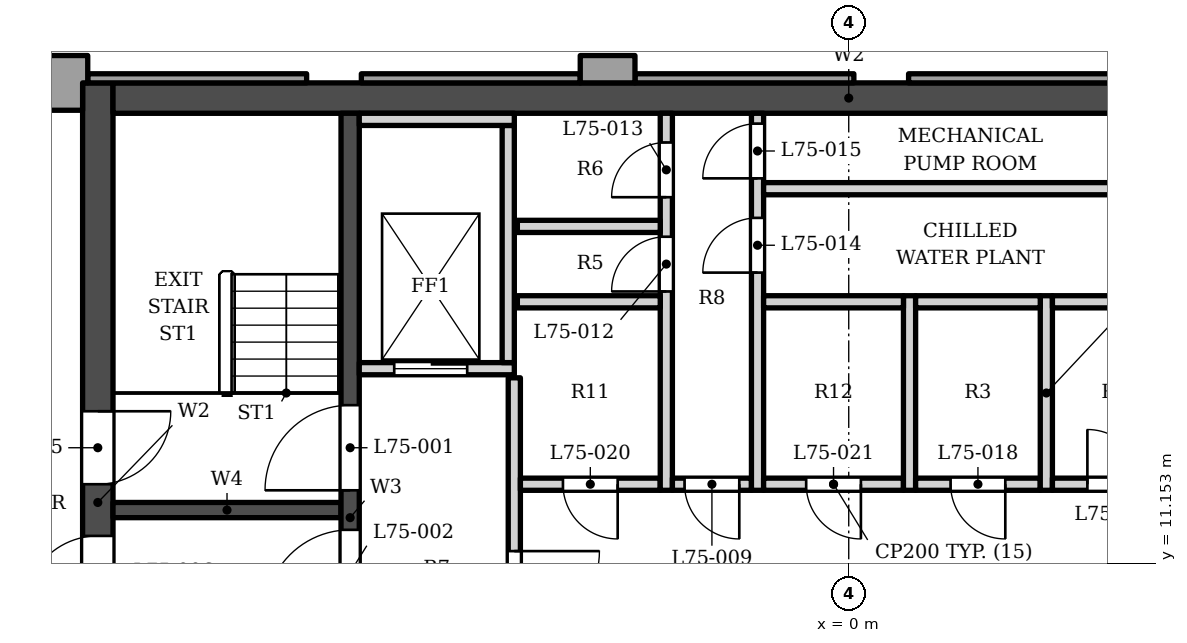
"""IFC4 building model, lengths in metres.
Left out: names, types, materials, properties, quantities, classifications, styles, units other than length and angle.
Written with IfcOpenShell. Run it as: python <this file> out.ifc"""

import sys

from ifc_helpers import new_model, si_unit, direction, frame, frame_2d, origin, place, context, subcontext, project, spatial, polyline, rectangle, outline, extrude, element, fill, save


model = new_model("IFC4")
c1 = context("Model", 3, precision=1e-05, world=origin(), true_north=direction((0.0, 1.0)))
c2 = subcontext(c1, "Body", "Model", "MODEL_VIEW")
j1 = project(units=[si_unit("LENGTHUNIT", "METRE"), si_unit("PLANEANGLEUNIT", "RADIAN")], contexts=[c1])
p1 = place(None, origin())
s1 = spatial("IfcSite", under=j1, at=p1, CompositionType="ELEMENT")
p2 = place(p1, origin())
s2 = spatial("IfcBuilding", under=s1, at=p2, CompositionType="ELEMENT")
p3 = place(p2, frame((0.0, 0.0, 320.5)))
s3 = spatial("IfcBuildingStorey", under=s2, at=p3, CompositionType="ELEMENT", Elevation=320.5)
p4 = place(p3, frame((-12.1, 18.802, 0.0), z_axis=(0.0, 0.0, 1.0), x_axis=(1.0, 0.0, 0.0)))
e1 = element("IfcWall", 1, at=p4, inside=s3, PredefinedType="SHEAR", context=c2, shape_type="SweptSolid", body=[
    extrude(rectangle(XDim=24.2, YDim=0.5, at=frame_2d((12.1, 0.0))), origin(), (0.0, 0.0, 1.0), 5.0),
])
p5 = place(p3, frame((-12.35, 5.253, 0.0), z_axis=(0.0, 0.0, 1.0), x_axis=(0.0, 1.0, 0.0)))
e2 = element("IfcWall", 2, at=p5, inside=s3, PredefinedType="SHEAR", context=c2, shape_type="SweptSolid", body=[
    extrude(rectangle(XDim=13.8, YDim=0.5, at=frame_2d((6.9, 0.0))), origin(), (0.0, 0.0, 1.0), 5.0),
])
p6 = place(p5, frame((7.2, 0.0, 0.0)))
e3 = element("IfcOpeningElement", 3, at=p6, cuts=e2, PredefinedType="OPENING", context=c2, shape_type="SweptSolid", body=[
    extrude(rectangle(XDim=1.2, YDim=2.1, at=frame_2d((0.6, 1.05))), frame((0.0, 0.26, 0.0), z_axis=(0.0, -1.0, 0.0), x_axis=(1.0, 0.0, 0.0)), (0.0, 0.0, 1.0), 0.52),
])
p7 = place(p5, frame((5.15, 0.0, 0.0)))
e4 = element("IfcOpeningElement", 4, at=p7, cuts=e2, PredefinedType="OPENING", context=c2, shape_type="SweptSolid", body=[
    extrude(rectangle(XDim=1.2, YDim=2.1, at=frame_2d((0.6, 1.05))), frame((0.0, 0.26, 0.0), z_axis=(0.0, -1.0, 0.0), x_axis=(1.0, 0.0, 0.0)), (0.0, 0.0, 1.0), 0.52),
])
p8 = place(p3, frame((-8.2, 5.253, 0.0), z_axis=(0.0, 0.0, 1.0), x_axis=(0.0, 1.0, 0.0)))
e5 = element("IfcWall", 5, at=p8, inside=s3, PredefinedType="SHEAR", context=c2, shape_type="SweptSolid", body=[
    extrude(rectangle(XDim=13.3, YDim=0.3, at=frame_2d((6.65, 0.0))), origin(), (0.0, 0.0, 1.0), 5.0),
])
p9 = place(p8, frame((7.1, 0.0, 0.0)))
e6 = element("IfcOpeningElement", 6, at=p9, cuts=e5, PredefinedType="OPENING", context=c2, shape_type="SweptSolid", body=[
    extrude(rectangle(XDim=1.4, YDim=2.1, at=frame_2d((0.7, 1.05))), frame((0.0, 0.16, 0.0), z_axis=(0.0, -1.0, 0.0), x_axis=(1.0, 0.0, 0.0)), (0.0, 0.0, 1.0), 0.32),
])
p10 = place(p8, frame((5.05, 0.0, 0.0)))
e7 = element("IfcOpeningElement", 7, at=p10, cuts=e5, PredefinedType="OPENING", context=c2, shape_type="SweptSolid", body=[
    extrude(rectangle(XDim=1.4, YDim=2.1, at=frame_2d((0.7, 1.05))), frame((0.0, 0.16, 0.0), z_axis=(0.0, -1.0, 0.0), x_axis=(1.0, 0.0, 0.0)), (0.0, 0.0, 1.0), 0.32),
])
p11 = place(p3, frame((-12.1, 12.028, 0.0), z_axis=(0.0, 0.0, 1.0), x_axis=(1.0, 0.0, 0.0)))
e8 = element("IfcWall", 8, at=p11, inside=s3, PredefinedType="SHEAR", context=c2, shape_type="SweptSolid", body=[
    extrude(rectangle(XDim=3.75, YDim=0.25, at=frame_2d((1.875, 0.0))), origin(), (0.0, 0.0, 1.0), 5.0),
])
p12 = place(p3, origin())
e9 = element("IfcWall", 9, at=p12, inside=s3, PredefinedType="SOLIDWALL", context=c2, shape_type="SweptSolid", body=[
    extrude(outline(polyline([(-4.416, 19.502), (-4.416, 19.052), (-3.516, 19.052), (-3.516, 19.502), (-4.416, 19.502)])), origin(), (0.0, 0.0, 1.0), 3.8),
])
p13 = place(p3, origin())
e10 = element("IfcWall", 10, at=p13, inside=s3, PredefinedType="SOLIDWALL", context=c2, shape_type="SweptSolid", body=[
    extrude(outline(polyline([(-13.416, 19.502), (-13.416, 18.603), (-12.6, 18.603), (-12.6, 19.052), (-12.516, 19.052), (-12.516, 19.502), (-13.416, 19.502)])), origin(), (0.0, 0.0, 1.0), 3.8),
])
p14 = place(p3, origin())
e11 = element("IfcWall", 11, at=p14, inside=s3, PredefinedType="ELEMENTEDWALL", context=c2, shape_type="SweptSolid", body=[
    extrude(outline(polyline([(4.584, 19.203), (0.984, 19.203), (0.984, 19.052), (4.584, 19.052), (4.584, 19.203)])), origin(), (0.0, 0.0, 1.0), 3.8),
])
p15 = place(p3, origin())
e12 = element("IfcWall", 12, at=p15, inside=s3, PredefinedType="ELEMENTEDWALL", context=c2, shape_type="SweptSolid", body=[
    extrude(outline(polyline([(0.084, 19.203), (-3.516, 19.203), (-3.516, 19.052), (0.084, 19.052), (0.084, 19.203)])), origin(), (0.0, 0.0, 1.0), 3.8),
])
p16 = place(p3, origin())
e13 = element("IfcWall", 13, at=p16, inside=s3, PredefinedType="ELEMENTEDWALL", context=c2, shape_type="SweptSolid", body=[
    extrude(outline(polyline([(-4.416, 19.203), (-8.016, 19.203), (-8.016, 19.052), (-4.416, 19.052), (-4.416, 19.203)])), origin(), (0.0, 0.0, 1.0), 3.8),
])
p17 = place(p3, origin())
e14 = element("IfcWall", 14, at=p17, inside=s3, PredefinedType="ELEMENTEDWALL", context=c2, shape_type="SweptSolid", body=[
    extrude(outline(polyline([(-8.916, 19.203), (-12.516, 19.203), (-12.516, 19.052), (-8.916, 19.052), (-8.916, 19.203)])), origin(), (0.0, 0.0, 1.0), 3.8),
])
p18 = place(p3, frame((-5.5, 6.353, 0.0), z_axis=(0.0, 0.0, 1.0), x_axis=(0.0, 1.0, 0.0)))
e15 = element("IfcWall", 15, at=p18, inside=s3, PredefinedType="SOLIDWALL", context=c2, shape_type="SweptSolid", body=[
    extrude(rectangle(XDim=7.85, YDim=0.2, at=frame_2d((3.925, 0.0))), origin(), (0.0, 0.0, 1.0), 4.8),
])
p19 = place(p18, frame((3.6, 0.0, 0.0)))
e16 = element("IfcOpeningElement", 16, at=p19, cuts=e15, PredefinedType="OPENING", context=c2, shape_type="SweptSolid", body=[
    extrude(rectangle(XDim=1.4, YDim=2.1, at=frame_2d((0.7, 1.05))), frame((0.0, 0.11, 0.0), z_axis=(0.0, -1.0, 0.0), x_axis=(1.0, 0.0, 0.0)), (0.0, 0.0, 1.0), 0.22),
])
p20 = place(p3, frame((-5.4, 12.453, 0.0), z_axis=(0.0, 0.0, 1.0), x_axis=(1.0, 0.0, 0.0)))
e17 = element("IfcWall", 17, at=p20, inside=s3, PredefinedType="PARTITIONING", context=c2, shape_type="SweptSolid", body=[
    extrude(rectangle(XDim=2.3, YDim=0.2, at=frame_2d((1.15, 0.0))), origin(), (0.0, 0.0, 1.0), 4.8),
])
p21 = place(p20, frame((0.7, 0.0, 0.0)))
e18 = element("IfcOpeningElement", 18, at=p21, cuts=e17, PredefinedType="OPENING", context=c2, shape_type="SweptSolid", body=[
    extrude(rectangle(XDim=0.9, YDim=2.1, at=frame_2d((0.45, 1.05))), frame((0.0, 0.11, 0.0), z_axis=(0.0, -1.0, 0.0), x_axis=(1.0, 0.0, 0.0)), (0.0, 0.0, 1.0), 0.22),
])
p22 = place(p3, frame((-3.0, 12.353, 0.0), z_axis=(0.0, 0.0, 1.0), x_axis=(0.0, 1.0, 0.0)))
e19 = element("IfcWall", 19, at=p22, inside=s3, PredefinedType="PARTITIONING", context=c2, shape_type="SweptSolid", body=[
    extrude(rectangle(XDim=6.2, YDim=0.2, at=frame_2d((3.1, 0.0))), origin(), (0.0, 0.0, 1.0), 4.8),
])
p23 = place(p22, frame((3.27, 0.0, 0.0)))
e20 = element("IfcOpeningElement", 20, at=p23, cuts=e19, PredefinedType="OPENING", context=c2, shape_type="SweptSolid", body=[
    extrude(rectangle(XDim=0.9, YDim=2.1, at=frame_2d((0.45, 1.05))), frame((0.0, 0.11, 0.0), z_axis=(0.0, -1.0, 0.0), x_axis=(1.0, 0.0, 0.0)), (0.0, 0.0, 1.0), 0.22),
])
p24 = place(p22, frame((4.82, 0.0, 0.0)))
e21 = element("IfcOpeningElement", 21, at=p24, cuts=e19, PredefinedType="OPENING", context=c2, shape_type="SweptSolid", body=[
    extrude(rectangle(XDim=0.9, YDim=2.1, at=frame_2d((0.45, 1.05))), frame((0.0, 0.11, 0.0), z_axis=(0.0, -1.0, 0.0), x_axis=(1.0, 0.0, 0.0)), (0.0, 0.0, 1.0), 0.22),
])
p25 = place(p3, frame((-2.9, 12.453, 0.0), z_axis=(0.0, 0.0, 1.0), x_axis=(1.0, 0.0, 0.0)))
e22 = element("IfcWall", 22, at=p25, inside=s3, PredefinedType="PARTITIONING", context=c2, shape_type="SweptSolid", body=[
    extrude(rectangle(XDim=1.3, YDim=0.2, at=frame_2d((0.65, 0.0))), origin(), (0.0, 0.0, 1.0), 4.8),
])
p26 = place(p25, frame((0.2, 0.0, 0.0)))
e23 = element("IfcOpeningElement", 23, at=p26, cuts=e22, PredefinedType="OPENING", context=c2, shape_type="SweptSolid", body=[
    extrude(rectangle(XDim=0.9, YDim=2.1, at=frame_2d((0.45, 1.05))), frame((0.0, 0.11, 0.0), z_axis=(0.0, -1.0, 0.0), x_axis=(1.0, 0.0, 0.0)), (0.0, 0.0, 1.0), 0.22),
])
p27 = place(p3, frame((-1.5, 12.353, 0.0), z_axis=(0.0, 0.0, 1.0), x_axis=(0.0, 1.0, 0.0)))
e24 = element("IfcWall", 24, at=p27, inside=s3, PredefinedType="PARTITIONING", context=c2, shape_type="SweptSolid", body=[
    extrude(rectangle(XDim=6.2, YDim=0.2, at=frame_2d((3.1, 0.0))), origin(), (0.0, 0.0, 1.0), 4.8),
])
p28 = place(p27, frame((3.58, 0.0, 0.0)))
e25 = element("IfcOpeningElement", 25, at=p28, cuts=e24, PredefinedType="OPENING", context=c2, shape_type="SweptSolid", body=[
    extrude(rectangle(XDim=0.9, YDim=2.1, at=frame_2d((0.45, 1.05))), frame((0.0, 0.11, 0.0), z_axis=(0.0, -1.0, 0.0), x_axis=(1.0, 0.0, 0.0)), (0.0, 0.0, 1.0), 0.22),
])
p29 = place(p27, frame((5.13, 0.0, 0.0)))
e26 = element("IfcOpeningElement", 26, at=p29, cuts=e24, PredefinedType="OPENING", context=c2, shape_type="SweptSolid", body=[
    extrude(rectangle(XDim=0.9, YDim=2.1, at=frame_2d((0.45, 1.05))), frame((0.0, 0.11, 0.0), z_axis=(0.0, -1.0, 0.0), x_axis=(1.0, 0.0, 0.0)), (0.0, 0.0, 1.0), 0.22),
])
p30 = place(p3, frame((-1.4, 12.453, 0.0), z_axis=(0.0, 0.0, 1.0), x_axis=(1.0, 0.0, 0.0)))
e27 = element("IfcWall", 27, at=p30, inside=s3, PredefinedType="PARTITIONING", context=c2, shape_type="SweptSolid", body=[
    extrude(rectangle(XDim=2.3, YDim=0.2, at=frame_2d((1.15, 0.0))), origin(), (0.0, 0.0, 1.0), 4.8),
])
p31 = place(p30, frame((0.7, 0.0, 0.0)))
e28 = element("IfcOpeningElement", 28, at=p31, cuts=e27, PredefinedType="OPENING", context=c2, shape_type="SweptSolid", body=[
    extrude(rectangle(XDim=0.9, YDim=2.1, at=frame_2d((0.45, 1.05))), frame((0.0, 0.11, 0.0), z_axis=(0.0, -1.0, 0.0), x_axis=(1.0, 0.0, 0.0)), (0.0, 0.0, 1.0), 0.22),
])
p32 = place(p3, frame((1.0, 12.353, 0.0), z_axis=(0.0, 0.0, 1.0), x_axis=(0.0, 1.0, 0.0)))
e29 = element("IfcWall", 29, at=p32, inside=s3, PredefinedType="PARTITIONING", context=c2, shape_type="SweptSolid", body=[
    extrude(rectangle(XDim=3.2, YDim=0.2, at=frame_2d((1.6, 0.0))), origin(), (0.0, 0.0, 1.0), 4.8),
])
p33 = place(p3, frame((1.1, 12.453, 0.0), z_axis=(0.0, 0.0, 1.0), x_axis=(1.0, 0.0, 0.0)))
e30 = element("IfcWall", 30, at=p33, inside=s3, PredefinedType="PARTITIONING", context=c2, shape_type="SweptSolid", body=[
    extrude(rectangle(XDim=2.05, YDim=0.2, at=frame_2d((1.025, 0.0))), origin(), (0.0, 0.0, 1.0), 4.8),
])
p34 = place(p33, frame((0.575, 0.0, 0.0)))
e31 = element("IfcOpeningElement", 31, at=p34, cuts=e30, PredefinedType="OPENING", context=c2, shape_type="SweptSolid", body=[
    extrude(rectangle(XDim=0.9, YDim=2.1, at=frame_2d((0.45, 1.05))), frame((0.0, 0.11, 0.0), z_axis=(0.0, -1.0, 0.0), x_axis=(1.0, 0.0, 0.0)), (0.0, 0.0, 1.0), 0.22),
])
p35 = place(p3, frame((3.25, 12.353, 0.0), z_axis=(0.0, 0.0, 1.0), x_axis=(0.0, 1.0, 0.0)))
e32 = element("IfcWall", 32, at=p35, inside=s3, PredefinedType="PARTITIONING", context=c2, shape_type="SweptSolid", body=[
    extrude(rectangle(XDim=3.2, YDim=0.2, at=frame_2d((1.6, 0.0))), origin(), (0.0, 0.0, 1.0), 4.8),
])
p36 = place(p3, frame((3.35, 12.453, 0.0), z_axis=(0.0, 0.0, 1.0), x_axis=(1.0, 0.0, 0.0)))
e33 = element("IfcWall", 33, at=p36, inside=s3, PredefinedType="PARTITIONING", context=c2, shape_type="SweptSolid", body=[
    extrude(rectangle(XDim=2.05, YDim=0.2, at=frame_2d((1.025, 0.0))), origin(), (0.0, 0.0, 1.0), 4.8),
])
p37 = place(p36, frame((0.575, 0.0, 0.0)))
e34 = element("IfcOpeningElement", 34, at=p37, cuts=e33, PredefinedType="OPENING", context=c2, shape_type="SweptSolid", body=[
    extrude(rectangle(XDim=0.9, YDim=2.1, at=frame_2d((0.45, 1.05))), frame((0.0, 0.11, 0.0), z_axis=(0.0, -1.0, 0.0), x_axis=(1.0, 0.0, 0.0)), (0.0, 0.0, 1.0), 0.22),
])
p38 = place(p3, frame((-8.05, 14.353, 0.0), z_axis=(0.0, 0.0, 1.0), x_axis=(1.0, 0.0, 0.0)))
e35 = element("IfcWall", 35, at=p38, inside=s3, PredefinedType="SOLIDWALL", context=c2, shape_type="SweptSolid", body=[
    extrude(rectangle(XDim=2.55, YDim=0.2, at=frame_2d((1.275, 0.0))), origin(), (0.0, 0.0, 1.0), 4.8),
])
p39 = place(p38, frame((0.575, 0.0, 0.0)))
e36 = element("IfcOpeningElement", 36, at=p39, cuts=e35, PredefinedType="OPENING", context=c2, shape_type="SweptSolid", body=[
    extrude(rectangle(XDim=1.2, YDim=2.1, at=frame_2d((0.6, 1.05))), frame((0.0, 0.11, 0.0), z_axis=(0.0, -1.0, 0.0), x_axis=(1.0, 0.0, 0.0)), (0.0, 0.0, 1.0), 0.22),
])
p40 = place(p3, frame((-5.6, 14.453, 0.0), z_axis=(0.0, 0.0, 1.0), x_axis=(0.0, 1.0, 0.0)))
e37 = element("IfcWall", 37, at=p40, inside=s3, PredefinedType="SOLIDWALL", context=c2, shape_type="SweptSolid", body=[
    extrude(rectangle(XDim=3.9, YDim=0.2, at=frame_2d((1.95, 0.0))), origin(), (0.0, 0.0, 1.0), 4.8),
])
p41 = place(p3, frame((-5.45, 15.453, 0.0), z_axis=(0.0, 0.0, 1.0), x_axis=(1.0, 0.0, 0.0)))
e38 = element("IfcWall", 38, at=p41, inside=s3, PredefinedType="SOLIDWALL", context=c2, shape_type="SweptSolid", body=[
    extrude(rectangle(XDim=2.35, YDim=0.2, at=frame_2d((1.175, 0.0))), origin(), (0.0, 0.0, 1.0), 4.8),
])
p42 = place(p3, frame((-1.4, 15.453, 0.0), z_axis=(0.0, 0.0, 1.0), x_axis=(1.0, 0.0, 0.0)))
e39 = element("IfcWall", 39, at=p42, inside=s3, PredefinedType="PARTITIONING", context=c2, shape_type="SweptSolid", body=[
    extrude(rectangle(XDim=2.3, YDim=0.2, at=frame_2d((1.15, 0.0))), origin(), (0.0, 0.0, 1.0), 4.8),
])
p43 = place(p3, frame((1.1, 15.453, 0.0), z_axis=(0.0, 0.0, 1.0), x_axis=(1.0, 0.0, 0.0)))
e40 = element("IfcWall", 40, at=p43, inside=s3, PredefinedType="PARTITIONING", context=c2, shape_type="SweptSolid", body=[
    extrude(rectangle(XDim=2.05, YDim=0.2, at=frame_2d((1.025, 0.0))), origin(), (0.0, 0.0, 1.0), 4.8),
])
p44 = place(p3, frame((3.35, 15.453, 0.0), z_axis=(0.0, 0.0, 1.0), x_axis=(1.0, 0.0, 0.0)))
e41 = element("IfcWall", 41, at=p44, inside=s3, PredefinedType="SOLIDWALL", context=c2, shape_type="SweptSolid", body=[
    extrude(rectangle(XDim=2.1, YDim=0.2, at=frame_2d((1.05, 0.0))), origin(), (0.0, 0.0, 1.0), 4.8),
])
p45 = place(p3, frame((-5.45, 16.693, 0.0), z_axis=(0.0, 0.0, 1.0), x_axis=(1.0, 0.0, 0.0)))
e42 = element("IfcWall", 42, at=p45, inside=s3, PredefinedType="SOLIDWALL", context=c2, shape_type="SweptSolid", body=[
    extrude(rectangle(XDim=2.35, YDim=0.2, at=frame_2d((1.175, 0.0))), origin(), (0.0, 0.0, 1.0), 4.8),
])
p46 = place(p3, frame((-1.4, 17.312, 0.0), z_axis=(0.0, 0.0, 1.0), x_axis=(1.0, 0.0, 0.0)))
e43 = element("IfcWall", 43, at=p46, inside=s3, PredefinedType="SOLIDWALL", context=c2, shape_type="SweptSolid", body=[
    extrude(rectangle(XDim=6.85, YDim=0.2, at=frame_2d((3.425, 0.0))), origin(), (0.0, 0.0, 1.0), 4.8),
])
p47 = place(p3, frame((-8.05, 18.453, 0.0), z_axis=(0.0, 0.0, 1.0), x_axis=(1.0, 0.0, 0.0)))
e44 = element("IfcWall", 44, at=p47, inside=s3, PredefinedType="SOLIDWALL", context=c2, shape_type="SweptSolid", body=[
    extrude(rectangle(XDim=2.55, YDim=0.2, at=frame_2d((1.275, 0.0))), origin(), (0.0, 0.0, 1.0), 4.8),
])
p48 = place(p39, origin())
e45 = element("IfcDoor", 45, at=p48, inside=s3, OperationType="DOUBLE_DOOR_SLIDING", PredefinedType="DOOR", context=c2, shape_type="SweptSolid", body=[
    extrude(rectangle(XDim=1.2, YDim=2.1, at=frame_2d((0.6, 1.05))), frame((0.0, 0.025, 0.0), z_axis=(0.0, -1.0, 0.0), x_axis=(1.0, 0.0, 0.0)), (0.0, 0.0, 1.0), 0.05),
])
fill(e36, e45)
p49 = place(p9, origin())
e46 = element("IfcDoor", 46, at=p49, inside=s3, OperationType="SINGLE_SWING_LEFT", PredefinedType="DOOR", context=c2, shape_type="SweptSolid", body=[
    extrude(rectangle(XDim=1.4, YDim=2.1, at=frame_2d((0.7, 1.05))), frame((0.0, 0.025, 0.0), z_axis=(0.0, -1.0, 0.0), x_axis=(1.0, 0.0, 0.0)), (0.0, 0.0, 1.0), 0.05),
])
fill(e6, e46)
p50 = place(p10, origin())
e47 = element("IfcDoor", 47, at=p50, inside=s3, OperationType="SINGLE_SWING_LEFT", PredefinedType="DOOR", context=c2, shape_type="SweptSolid", body=[
    extrude(rectangle(XDim=1.4, YDim=2.1, at=frame_2d((0.7, 1.05))), frame((0.0, 0.025, 0.0), z_axis=(0.0, -1.0, 0.0), x_axis=(1.0, 0.0, 0.0)), (0.0, 0.0, 1.0), 0.05),
])
fill(e7, e47)
p51 = place(p6, origin())
e48 = element("IfcDoor", 48, at=p51, inside=s3, OperationType="SINGLE_SWING_RIGHT", PredefinedType="DOOR", context=c2, shape_type="SweptSolid", body=[
    extrude(rectangle(XDim=1.2, YDim=2.1, at=frame_2d((0.6, 1.05))), frame((0.0, 0.025, 0.0), z_axis=(0.0, -1.0, 0.0), x_axis=(1.0, 0.0, 0.0)), (0.0, 0.0, 1.0), 0.05),
])
fill(e3, e48)
p52 = place(p7, origin())
e49 = element("IfcDoor", 49, at=p52, inside=s3, OperationType="SINGLE_SWING_LEFT", PredefinedType="DOOR", context=c2, shape_type="SweptSolid", body=[
    extrude(rectangle(XDim=1.2, YDim=2.1, at=frame_2d((0.6, 1.05))), frame((0.0, 0.025, 0.0), z_axis=(0.0, -1.0, 0.0), x_axis=(1.0, 0.0, 0.0)), (0.0, 0.0, 1.0), 0.05),
])
fill(e4, e49)
p53 = place(p26, origin())
e50 = element("IfcDoor", 50, at=p53, inside=s3, OperationType="SINGLE_SWING_RIGHT", PredefinedType="DOOR", context=c2, shape_type="SweptSolid", body=[
    extrude(rectangle(XDim=0.9, YDim=2.1, at=frame_2d((0.45, 1.05))), frame((0.0, 0.025, 0.0), z_axis=(0.0, -1.0, 0.0), x_axis=(1.0, 0.0, 0.0)), (0.0, 0.0, 1.0), 0.05),
])
fill(e23, e50)
p54 = place(p19, origin())
e51 = element("IfcDoor", 51, at=p54, inside=s3, OperationType="SINGLE_SWING_RIGHT", PredefinedType="DOOR", context=c2, shape_type="SweptSolid", body=[
    extrude(rectangle(XDim=1.4, YDim=2.1, at=frame_2d((0.7, 1.05))), frame((0.0, 0.025, 0.0), z_axis=(0.0, -1.0, 0.0), x_axis=(1.0, 0.0, 0.0)), (0.0, 0.0, 1.0), 0.05),
])
fill(e16, e51)
p55 = place(p23, origin())
e52 = element("IfcDoor", 52, at=p55, inside=s3, OperationType="SINGLE_SWING_LEFT", PredefinedType="DOOR", context=c2, shape_type="SweptSolid", body=[
    extrude(rectangle(XDim=0.9, YDim=2.1, at=frame_2d((0.45, 1.05))), frame((0.0, 0.025, 0.0), z_axis=(0.0, -1.0, 0.0), x_axis=(1.0, 0.0, 0.0)), (0.0, 0.0, 1.0), 0.05),
])
fill(e20, e52)
p56 = place(p24, origin())
e53 = element("IfcDoor", 53, at=p56, inside=s3, OperationType="SINGLE_SWING_LEFT", PredefinedType="DOOR", context=c2, shape_type="SweptSolid", body=[
    extrude(rectangle(XDim=0.9, YDim=2.1, at=frame_2d((0.45, 1.05))), frame((0.0, 0.025, 0.0), z_axis=(0.0, -1.0, 0.0), x_axis=(1.0, 0.0, 0.0)), (0.0, 0.0, 1.0), 0.05),
])
fill(e21, e53)
p57 = place(p28, origin())
e54 = element("IfcDoor", 54, at=p57, inside=s3, OperationType="SINGLE_SWING_LEFT", PredefinedType="DOOR", context=c2, shape_type="SweptSolid", body=[
    extrude(rectangle(XDim=0.9, YDim=2.1, at=frame_2d((0.45, 1.05))), frame((0.0, 0.025, 0.0), z_axis=(0.0, -1.0, 0.0), x_axis=(1.0, 0.0, 0.0)), (0.0, 0.0, 1.0), 0.05),
])
fill(e25, e54)
p58 = place(p29, origin())
e55 = element("IfcDoor", 55, at=p58, inside=s3, OperationType="SINGLE_SWING_LEFT", PredefinedType="DOOR", context=c2, shape_type="SweptSolid", body=[
    extrude(rectangle(XDim=0.9, YDim=2.1, at=frame_2d((0.45, 1.05))), frame((0.0, 0.025, 0.0), z_axis=(0.0, -1.0, 0.0), x_axis=(1.0, 0.0, 0.0)), (0.0, 0.0, 1.0), 0.05),
])
fill(e26, e55)
p59 = place(p34, origin())
e56 = element("IfcDoor", 56, at=p59, inside=s3, OperationType="SINGLE_SWING_RIGHT", PredefinedType="DOOR", context=c2, shape_type="SweptSolid", body=[
    extrude(rectangle(XDim=0.9, YDim=2.1, at=frame_2d((0.45, 1.05))), frame((0.0, 0.025, 0.0), z_axis=(0.0, -1.0, 0.0), x_axis=(1.0, 0.0, 0.0)), (0.0, 0.0, 1.0), 0.05),
])
fill(e31, e56)
p60 = place(p37, origin())
e57 = element("IfcDoor", 57, at=p60, inside=s3, OperationType="SINGLE_SWING_LEFT", PredefinedType="DOOR", context=c2, shape_type="SweptSolid", body=[
    extrude(rectangle(XDim=0.9, YDim=2.1, at=frame_2d((0.45, 1.05))), frame((0.0, 0.025, 0.0), z_axis=(0.0, -1.0, 0.0), x_axis=(1.0, 0.0, 0.0)), (0.0, 0.0, 1.0), 0.05),
])
fill(e34, e57)
p61 = place(p21, origin())
e58 = element("IfcDoor", 58, at=p61, inside=s3, OperationType="SINGLE_SWING_RIGHT", PredefinedType="DOOR", context=c2, shape_type="SweptSolid", body=[
    extrude(rectangle(XDim=0.9, YDim=2.1, at=frame_2d((0.45, 1.05))), frame((0.0, 0.025, 0.0), z_axis=(0.0, -1.0, 0.0), x_axis=(1.0, 0.0, 0.0)), (0.0, 0.0, 1.0), 0.05),
])
fill(e18, e58)
p62 = place(p31, origin())
e59 = element("IfcDoor", 59, at=p62, inside=s3, OperationType="SINGLE_SWING_RIGHT", PredefinedType="DOOR", context=c2, shape_type="SweptSolid", body=[
    extrude(rectangle(XDim=0.9, YDim=2.1, at=frame_2d((0.45, 1.05))), frame((0.0, 0.025, 0.0), z_axis=(0.0, -1.0, 0.0), x_axis=(1.0, 0.0, 0.0)), (0.0, 0.0, 1.0), 0.05),
])
fill(e28, e59)
save(model, sys.argv[1])
